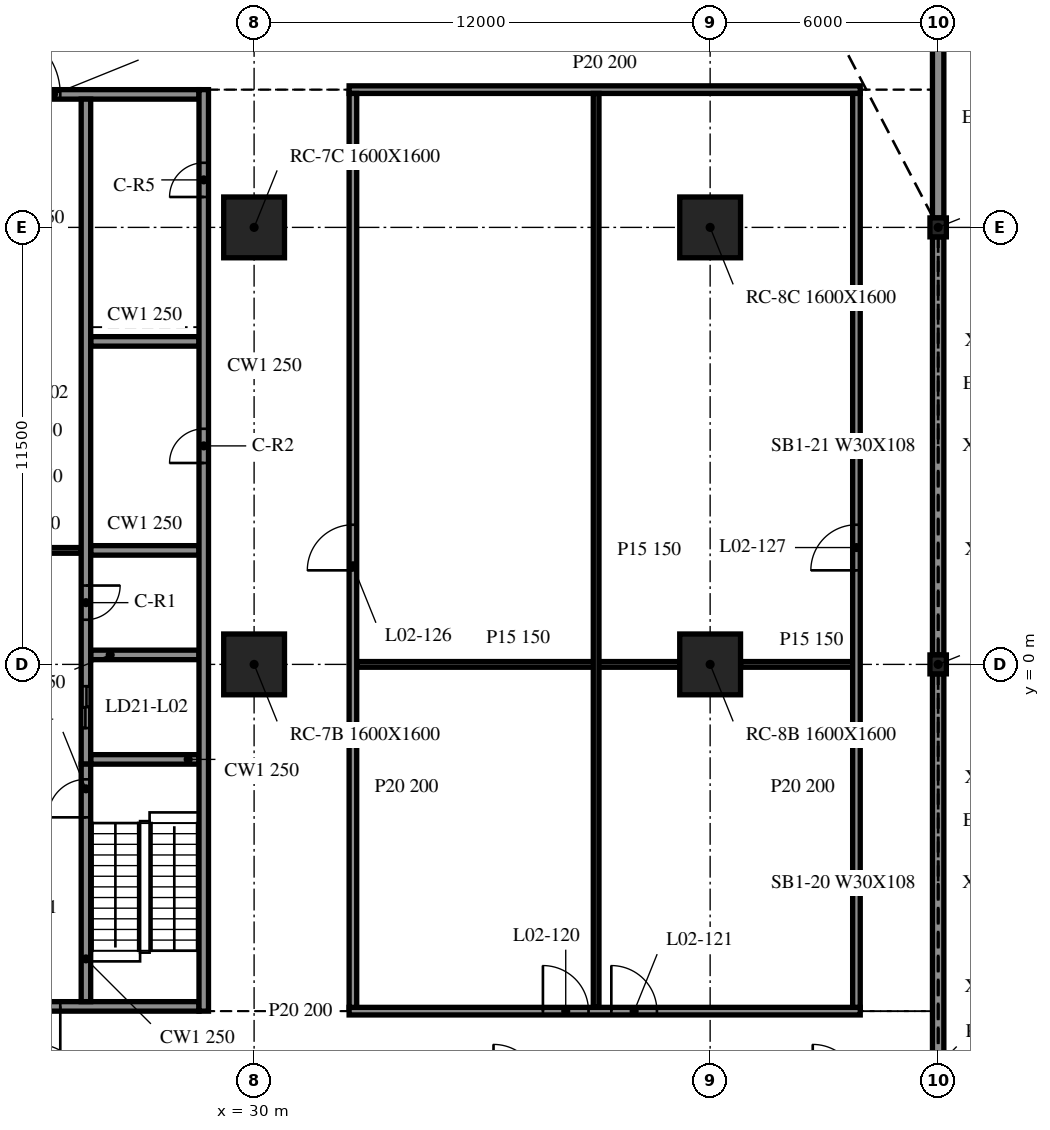
"""IFC4 building model, lengths in metres.
Left out: names, types, materials, properties, quantities, classifications, styles, units other than length and angle.
Written with IfcOpenShell. Run it as: python <this file> out.ifc"""

import sys

from ifc_helpers import new_model, si_unit, direction, frame, frame_2d, origin, origin_2d, place, context, subcontext, project, spatial, rectangle, i_section, extrude, element, fill, save


model = new_model("IFC4")
c1 = context("Model", 3, precision=1e-05, world=origin(), true_north=direction((0.0, 1.0)))
c2 = subcontext(c1, "Body", "Model", "MODEL_VIEW")
j1 = project(units=[si_unit("LENGTHUNIT", "METRE"), si_unit("PLANEANGLEUNIT", "RADIAN")], contexts=[c1])
p1 = place(None, origin())
s1 = spatial("IfcSite", under=j1, at=p1, CompositionType="ELEMENT")
p2 = place(p1, origin())
s2 = spatial("IfcBuilding", under=s1, at=p2, CompositionType="ELEMENT")
p3 = place(p2, frame((0.0, 0.0, 11.5)))
s3 = spatial("IfcBuildingStorey", under=s2, at=p3, CompositionType="ELEMENT", Elevation=11.5)
for number, where, z_axis, x_axis in (
    (1, (30.0, 0.0, -0.34), (0.0, 0.0, 1.0), (1.0, 0.0, 0.0)),
    (2, (30.0, 11.5, -0.34), (0.0, 0.0, 1.0), (1.0, 0.0, 0.0)),
    (3, (42.0, 0.0, -0.34), (0.0, 0.0, 1.0), (1.0, 0.0, 0.0)),
    (4, (42.0, 11.5, -0.34), (0.0, 0.0, 1.0), (1.0, 0.0, 0.0)),
):
    element("IfcColumn", number, at=place(p3, frame(where, z_axis=z_axis, x_axis=x_axis)), inside=s3, PredefinedType="COLUMN", context=c2, shape_type="SweptSolid", body=[
        extrude(rectangle(XDim=1.6, YDim=1.6, at=origin_2d()), origin(), (0.0, 0.0, 1.0), 4.3),
    ])
for number, where, z_axis, x_axis in (
    (5, (48.0, 0.0, -0.34), (0.0, 0.0, 1.0), (1.0, 0.0, 0.0)),
    (6, (48.0, 11.5, -0.34), (0.0, 0.0, 1.0), (1.0, 0.0, 0.0)),
):
    element("IfcColumn", number, at=place(p3, frame(where, z_axis=z_axis, x_axis=x_axis)), inside=s3, PredefinedType="COLUMN", context=c2, shape_type="SweptSolid", body=[
        extrude(i_section(OverallWidth=0.432, OverallDepth=0.498, WebThickness=0.056, FlangeThickness=0.089, at=origin_2d()), origin(), (0.0, 0.0, 1.0), 4.3),
    ])
for number, where, z_axis, x_axis in (
    (7, (48.0, -11.251, 0.0), (0.0, 0.0, 1.0), (0.0, 1.0, 0.0)),
    (8, (48.0, 0.249, 0.0), (0.0, 0.0, 1.0), (0.0, 1.0, 0.0)),
):
    element("IfcWall", number, at=place(p3, frame(where, z_axis=z_axis, x_axis=x_axis)), inside=s3, PredefinedType="NOTDEFINED", context=c2, shape_type="SweptSolid", body=[
        extrude(rectangle(XDim=11.002, YDim=0.3, at=frame_2d((5.501, 0.0))), origin(), (0.0, 0.0, 1.0), 3.203),
    ])
p4 = place(p3, frame((48.0, 11.749, 0.0), z_axis=(0.0, 0.0, 1.0), x_axis=(0.0, 1.0, 0.0)))
e9 = element("IfcWall", 9, at=p4, inside=s3, PredefinedType="NOTDEFINED", context=c2, shape_type="SweptSolid", body=[
    extrude(rectangle(XDim=5.251, YDim=0.3, at=frame_2d((2.625, 0.0))), origin(), (0.0, 0.0, 1.0), 3.203),
])
p5 = place(p3, frame((28.675, -9.125, 0.0), z_axis=(0.0, 0.0, 1.0), x_axis=(0.0, 1.0, 0.0)))
e10 = element("IfcWall", 10, at=p5, inside=s3, PredefinedType="SOLIDWALL", context=c2, shape_type="SweptSolid", body=[
    extrude(rectangle(XDim=24.25, YDim=0.25, at=frame_2d((12.125, 0.0))), origin(), (0.0, 0.0, 1.0), 3.96),
])
p6 = place(p5, frame((14.425, 0.0, 0.0)))
e11 = element("IfcOpeningElement", 11, at=p6, cuts=e10, PredefinedType="OPENING", context=c2, shape_type="SweptSolid", body=[
    extrude(rectangle(XDim=0.9, YDim=2.1, at=frame_2d((0.45, 1.05))), frame((0.0, 0.135, 0.0), z_axis=(0.0, -1.0, 0.0), x_axis=(1.0, 0.0, 0.0)), (0.0, 0.0, 1.0), 0.27),
])
p7 = place(p5, frame((21.425, 0.0, 0.0)))
e12 = element("IfcOpeningElement", 12, at=p7, cuts=e10, PredefinedType="OPENING", context=c2, shape_type="SweptSolid", body=[
    extrude(rectangle(XDim=0.9, YDim=2.1, at=frame_2d((0.45, 1.05))), frame((0.0, 0.135, 0.0), z_axis=(0.0, -1.0, 0.0), x_axis=(1.0, 0.0, 0.0)), (0.0, 0.0, 1.0), 0.27),
])
p8 = place(p3, frame((28.55, -9.0, 0.0), z_axis=(0.0, 0.0, 1.0), x_axis=(-1.0, 0.0, 0.0)))
e13 = element("IfcWall", 13, at=p8, inside=s3, PredefinedType="SOLIDWALL", context=c2, shape_type="SweptSolid", body=[
    extrude(rectangle(XDim=9.1, YDim=0.25, at=frame_2d((4.55, 0.0))), origin(), (0.0, 0.0, 1.0), 3.96),
])
p9 = place(p8, frame((3.65, 0.0, 0.0)))
e14 = element("IfcOpeningElement", 14, at=p9, cuts=e13, PredefinedType="OPENING", context=c2, shape_type="SweptSolid", body=[
    extrude(rectangle(XDim=1.8, YDim=2.1, at=frame_2d((0.9, 1.05))), frame((0.0, 0.135, 0.0), z_axis=(0.0, -1.0, 0.0), x_axis=(1.0, 0.0, 0.0)), (0.0, 0.0, 1.0), 0.27),
])
p10 = place(p3, frame((19.45, 15.0, 0.0), z_axis=(0.0, 0.0, 1.0), x_axis=(1.0, 0.0, 0.0)))
e15 = element("IfcWall", 15, at=p10, inside=s3, PredefinedType="SOLIDWALL", context=c2, shape_type="SweptSolid", body=[
    extrude(rectangle(XDim=9.1, YDim=0.25, at=frame_2d((4.55, 0.0))), origin(), (0.0, 0.0, 1.0), 3.96),
])
p11 = place(p10, frame((3.65, 0.0, 0.0)))
e16 = element("IfcOpeningElement", 16, at=p11, cuts=e15, PredefinedType="OPENING", context=c2, shape_type="SweptSolid", body=[
    extrude(rectangle(XDim=1.8, YDim=2.1, at=frame_2d((0.9, 1.05))), frame((0.0, 0.135, 0.0), z_axis=(0.0, -1.0, 0.0), x_axis=(1.0, 0.0, 0.0)), (0.0, 0.0, 1.0), 0.27),
])
p12 = place(p3, frame((25.575, -8.875, 0.0), z_axis=(0.0, 0.0, 1.0), x_axis=(0.0, 1.0, 0.0)))
e17 = element("IfcWall", 17, at=p12, inside=s3, PredefinedType="SOLIDWALL", context=c2, shape_type="SweptSolid", body=[
    extrude(rectangle(XDim=6.25, YDim=0.25, at=frame_2d((3.125, 0.0))), origin(), (0.0, 0.0, 1.0), 3.96),
])
p13 = place(p12, frame((4.85, 0.0, 0.0)))
e18 = element("IfcOpeningElement", 18, at=p13, cuts=e17, PredefinedType="OPENING", context=c2, shape_type="SweptSolid", body=[
    extrude(rectangle(XDim=1.0, YDim=2.1, at=frame_2d((0.5, 1.05))), frame((0.0, 0.135, 0.0), z_axis=(0.0, -1.0, 0.0), x_axis=(1.0, 0.0, 0.0)), (0.0, 0.0, 1.0), 0.27),
])
p14 = place(p3, frame((25.575, 14.875, 0.0), z_axis=(0.0, 0.0, 1.0), x_axis=(0.0, -1.0, 0.0)))
e19 = element("IfcWall", 19, at=p14, inside=s3, PredefinedType="SOLIDWALL", context=c2, shape_type="SweptSolid", body=[
    extrude(rectangle(XDim=17.5, YDim=0.25, at=frame_2d((8.75, 0.0))), origin(), (0.0, 0.0, 1.0), 3.96),
])
p15 = place(p14, frame((15.45, 0.0, 0.0)))
e20 = element("IfcOpeningElement", 20, at=p15, cuts=e19, PredefinedType="OPENING", context=c2, shape_type="SweptSolid", body=[
    extrude(rectangle(XDim=1.1, YDim=2.1, at=frame_2d((0.55, 1.05))), frame((0.0, 0.135, 0.0), z_axis=(0.0, -1.0, 0.0), x_axis=(1.0, 0.0, 0.0)), (0.0, 0.0, 1.0), 0.27),
])
p16 = place(p14, frame((12.8, 0.0, 0.0)))
e21 = element("IfcOpeningElement", 21, at=p16, cuts=e19, PredefinedType="OPENING", context=c2, shape_type="SweptSolid", body=[
    extrude(rectangle(XDim=0.9, YDim=2.1, at=frame_2d((0.45, 1.05))), frame((0.0, 0.135, 0.0), z_axis=(0.0, -1.0, 0.0), x_axis=(1.0, 0.0, 0.0)), (0.0, 0.0, 1.0), 0.27),
])
for number, where, z_axis, x_axis in (
    (22, (25.7, -2.5, 0.0), (0.0, 0.0, 1.0), (1.0, 0.0, 0.0)),
    (23, (25.7, 0.25, 0.0), (0.0, 0.0, 1.0), (1.0, 0.0, 0.0)),
    (24, (25.7, 3.0, 0.0), (0.0, 0.0, 1.0), (1.0, 0.0, 0.0)),
    (25, (25.7, 8.5, 0.0), (0.0, 0.0, 1.0), (1.0, 0.0, 0.0)),
):
    element("IfcWall", number, at=place(p3, frame(where, z_axis=z_axis, x_axis=x_axis)), inside=s3, PredefinedType="SOLIDWALL", context=c2, shape_type="SweptSolid", body=[
        extrude(rectangle(XDim=2.85, YDim=0.25, at=frame_2d((1.425, 0.0))), origin(), (0.0, 0.0, 1.0), 3.96),
    ])
p17 = place(p3, frame((22.55, 3.0, 0.0), z_axis=(0.0, 0.0, 1.0), x_axis=(1.0, 0.0, 0.0)))
e26 = element("IfcWall", 26, at=p17, inside=s3, PredefinedType="PARTITIONING", context=c2, shape_type="SweptSolid", body=[
    extrude(rectangle(XDim=2.9, YDim=0.15, at=frame_2d((1.45, 0.0))), origin(), (0.0, 0.0, 1.0), 3.96),
])
p18 = place(p3, frame((32.5, -9.125, 0.0), z_axis=(0.0, 0.0, 1.0), x_axis=(1.0, 0.0, 0.0)))
e27 = element("IfcWall", 27, at=p18, inside=s3, PredefinedType="PARTITIONING", context=c2, shape_type="SweptSolid", body=[
    extrude(rectangle(XDim=13.45, YDim=0.2, at=frame_2d((6.725, 0.0))), origin(), (0.0, 0.0, 1.0), 3.96),
])
p19 = place(p18, frame((5.1, 0.0, 0.0)))
e28 = element("IfcOpeningElement", 28, at=p19, cuts=e27, PredefinedType="OPENING", context=c2, shape_type="SweptSolid", body=[
    extrude(rectangle(XDim=1.2, YDim=2.1, at=frame_2d((0.6, 1.05))), frame((0.0, 0.11, 0.0), z_axis=(0.0, -1.0, 0.0), x_axis=(1.0, 0.0, 0.0)), (0.0, 0.0, 1.0), 0.22),
])
p20 = place(p18, frame((6.9, 0.0, 0.0)))
e29 = element("IfcOpeningElement", 29, at=p20, cuts=e27, PredefinedType="OPENING", context=c2, shape_type="SweptSolid", body=[
    extrude(rectangle(XDim=1.2, YDim=2.1, at=frame_2d((0.6, 1.05))), frame((0.0, 0.11, 0.0), z_axis=(0.0, -1.0, 0.0), x_axis=(1.0, 0.0, 0.0)), (0.0, 0.0, 1.0), 0.22),
])
p21 = place(p3, frame((32.7, 0.0, 0.0), z_axis=(0.0, 0.0, 1.0), x_axis=(1.0, 0.0, 0.0)))
e30 = element("IfcWall", 30, at=p21, inside=s3, PredefinedType="PARTITIONING", context=c2, shape_type="SweptSolid", body=[
    extrude(rectangle(XDim=8.5, YDim=0.15, at=frame_2d((4.25, 0.0))), origin(), (0.0, 0.0, 1.0), 3.96),
])
p22 = place(p3, frame((42.8, 0.0, 0.0), z_axis=(0.0, 0.0, 1.0), x_axis=(1.0, 0.0, 0.0)))
e31 = element("IfcWall", 31, at=p22, inside=s3, PredefinedType="PARTITIONING", context=c2, shape_type="SweptSolid", body=[
    extrude(rectangle(XDim=2.95, YDim=0.15, at=frame_2d((1.475, 0.0))), origin(), (0.0, 0.0, 1.0), 3.96),
])
p23 = place(p3, frame((32.5, 15.125, 0.0), z_axis=(0.0, 0.0, 1.0), x_axis=(1.0, 0.0, 0.0)))
e32 = element("IfcWall", 32, at=p23, inside=s3, PredefinedType="PARTITIONING", context=c2, shape_type="SweptSolid", body=[
    extrude(rectangle(XDim=13.45, YDim=0.2, at=frame_2d((6.725, 0.0))), origin(), (0.0, 0.0, 1.0), 3.96),
])
p24 = place(p3, frame((32.6, -9.025, 0.0), z_axis=(0.0, 0.0, 1.0), x_axis=(0.0, 1.0, 0.0)))
e33 = element("IfcWall", 33, at=p24, inside=s3, PredefinedType="PARTITIONING", context=c2, shape_type="SweptSolid", body=[
    extrude(rectangle(XDim=24.05, YDim=0.2, at=frame_2d((12.025, 0.0))), origin(), (0.0, 0.0, 1.0), 3.96),
])
p25 = place(p24, frame((11.5, 0.0, 0.0)))
e34 = element("IfcOpeningElement", 34, at=p25, cuts=e33, PredefinedType="OPENING", context=c2, shape_type="SweptSolid", body=[
    extrude(rectangle(XDim=1.2, YDim=2.1, at=frame_2d((0.6, 1.05))), frame((0.0, 0.11, 0.0), z_axis=(0.0, -1.0, 0.0), x_axis=(1.0, 0.0, 0.0)), (0.0, 0.0, 1.0), 0.22),
])
p26 = place(p3, frame((39.0, -9.025, 0.0), z_axis=(0.0, 0.0, 1.0), x_axis=(0.0, 1.0, 0.0)))
e35 = element("IfcWall", 35, at=p26, inside=s3, PredefinedType="PARTITIONING", context=c2, shape_type="SweptSolid", body=[
    extrude(rectangle(XDim=24.05, YDim=0.15, at=frame_2d((12.025, 0.0))), origin(), (0.0, 0.0, 1.0), 3.96),
])
p27 = place(p3, frame((45.85, -9.025, 0.0), z_axis=(0.0, 0.0, 1.0), x_axis=(0.0, 1.0, 0.0)))
e36 = element("IfcWall", 36, at=p27, inside=s3, PredefinedType="PARTITIONING", context=c2, shape_type="SweptSolid", body=[
    extrude(rectangle(XDim=24.05, YDim=0.2, at=frame_2d((12.025, 0.0))), origin(), (0.0, 0.0, 1.0), 3.96),
])
p28 = place(p27, frame((11.5, 0.0, 0.0)))
e37 = element("IfcOpeningElement", 37, at=p28, cuts=e36, PredefinedType="OPENING", context=c2, shape_type="SweptSolid", body=[
    extrude(rectangle(XDim=1.2, YDim=2.1, at=frame_2d((0.6, 1.05))), frame((0.0, 0.11, 0.0), z_axis=(0.0, -1.0, 0.0), x_axis=(1.0, 0.0, 0.0)), (0.0, 0.0, 1.0), 0.22),
])
p29 = place(p9, origin())
e38 = element("IfcDoor", 38, at=p29, inside=s3, OperationType="DOUBLE_DOOR_SINGLE_SWING", PredefinedType="DOOR", context=c2, shape_type="SweptSolid", body=[
    extrude(rectangle(XDim=1.8, YDim=2.1, at=frame_2d((0.9, 1.05))), frame((0.0, 0.025, 0.0), z_axis=(0.0, -1.0, 0.0), x_axis=(1.0, 0.0, 0.0)), (0.0, 0.0, 1.0), 0.05),
])
fill(e14, e38)
p30 = place(p11, origin())
e39 = element("IfcDoor", 39, at=p30, inside=s3, OperationType="DOUBLE_DOOR_SINGLE_SWING", PredefinedType="DOOR", context=c2, shape_type="SweptSolid", body=[
    extrude(rectangle(XDim=1.8, YDim=2.1, at=frame_2d((0.9, 1.05))), frame((0.0, 0.025, 0.0), z_axis=(0.0, -1.0, 0.0), x_axis=(1.0, 0.0, 0.0)), (0.0, 0.0, 1.0), 0.05),
])
fill(e16, e39)
p31 = place(p15, origin())
e40 = element("IfcDoor", 40, at=p31, inside=s3, OperationType="DOUBLE_DOOR_SLIDING", PredefinedType="DOOR", context=c2, shape_type="SweptSolid", body=[
    extrude(rectangle(XDim=1.1, YDim=2.1, at=frame_2d((0.55, 1.05))), frame((0.0, 0.025, 0.0), z_axis=(0.0, -1.0, 0.0), x_axis=(1.0, 0.0, 0.0)), (0.0, 0.0, 1.0), 0.05),
])
fill(e20, e40)
p32 = place(p16, origin())
e41 = element("IfcDoor", 41, at=p32, inside=s3, OperationType="SINGLE_SWING_LEFT", PredefinedType="DOOR", context=c2, shape_type="SweptSolid", body=[
    extrude(rectangle(XDim=0.9, YDim=2.1, at=frame_2d((0.45, 1.05))), frame((0.0, 0.025, 0.0), z_axis=(0.0, -1.0, 0.0), x_axis=(1.0, 0.0, 0.0)), (0.0, 0.0, 1.0), 0.05),
])
fill(e21, e41)
p33 = place(p6, origin())
e42 = element("IfcDoor", 42, at=p33, inside=s3, OperationType="SINGLE_SWING_RIGHT", PredefinedType="DOOR", context=c2, shape_type="SweptSolid", body=[
    extrude(rectangle(XDim=0.9, YDim=2.1, at=frame_2d((0.45, 1.05))), frame((0.0, 0.025, 0.0), z_axis=(0.0, -1.0, 0.0), x_axis=(1.0, 0.0, 0.0)), (0.0, 0.0, 1.0), 0.05),
])
fill(e11, e42)
p34 = place(p7, origin())
e43 = element("IfcDoor", 43, at=p34, inside=s3, OperationType="SINGLE_SWING_LEFT", PredefinedType="DOOR", context=c2, shape_type="SweptSolid", body=[
    extrude(rectangle(XDim=0.9, YDim=2.1, at=frame_2d((0.45, 1.05))), frame((0.0, 0.025, 0.0), z_axis=(0.0, -1.0, 0.0), x_axis=(1.0, 0.0, 0.0)), (0.0, 0.0, 1.0), 0.05),
])
fill(e12, e43)
p35 = place(p13, origin())
e44 = element("IfcDoor", 44, at=p35, inside=s3, OperationType="SINGLE_SWING_LEFT", PredefinedType="DOOR", context=c2, shape_type="SweptSolid", body=[
    extrude(rectangle(XDim=1.0, YDim=2.1, at=frame_2d((0.5, 1.05))), frame((0.0, 0.025, 0.0), z_axis=(0.0, -1.0, 0.0), x_axis=(1.0, 0.0, 0.0)), (0.0, 0.0, 1.0), 0.05),
])
fill(e18, e44)
p36 = place(p19, origin())
e45 = element("IfcDoor", 45, at=p36, inside=s3, OperationType="SINGLE_SWING_LEFT", PredefinedType="DOOR", context=c2, shape_type="SweptSolid", body=[
    extrude(rectangle(XDim=1.2, YDim=2.1, at=frame_2d((0.6, 1.05))), frame((0.0, 0.025, 0.0), z_axis=(0.0, -1.0, 0.0), x_axis=(1.0, 0.0, 0.0)), (0.0, 0.0, 1.0), 0.05),
])
fill(e28, e45)
p37 = place(p20, origin())
e46 = element("IfcDoor", 46, at=p37, inside=s3, OperationType="SINGLE_SWING_RIGHT", PredefinedType="DOOR", context=c2, shape_type="SweptSolid", body=[
    extrude(rectangle(XDim=1.2, YDim=2.1, at=frame_2d((0.6, 1.05))), frame((0.0, 0.025, 0.0), z_axis=(0.0, -1.0, 0.0), x_axis=(1.0, 0.0, 0.0)), (0.0, 0.0, 1.0), 0.05),
])
fill(e29, e46)
p38 = place(p25, origin())
e47 = element("IfcDoor", 47, at=p38, inside=s3, OperationType="SINGLE_SWING_LEFT", PredefinedType="DOOR", context=c2, shape_type="SweptSolid", body=[
    extrude(rectangle(XDim=1.2, YDim=2.1, at=frame_2d((0.6, 1.05))), frame((0.0, 0.025, 0.0), z_axis=(0.0, -1.0, 0.0), x_axis=(1.0, 0.0, 0.0)), (0.0, 0.0, 1.0), 0.05),
])
fill(e34, e47)
p39 = place(p28, origin())
e48 = element("IfcDoor", 48, at=p39, inside=s3, OperationType="SINGLE_SWING_RIGHT", PredefinedType="DOOR", context=c2, shape_type="SweptSolid", body=[
    extrude(rectangle(XDim=1.2, YDim=2.1, at=frame_2d((0.6, 1.05))), frame((0.0, 0.025, 0.0), z_axis=(0.0, -1.0, 0.0), x_axis=(1.0, 0.0, 0.0)), (0.0, 0.0, 1.0), 0.05),
])
fill(e37, e48)
save(model, sys.argv[1])
